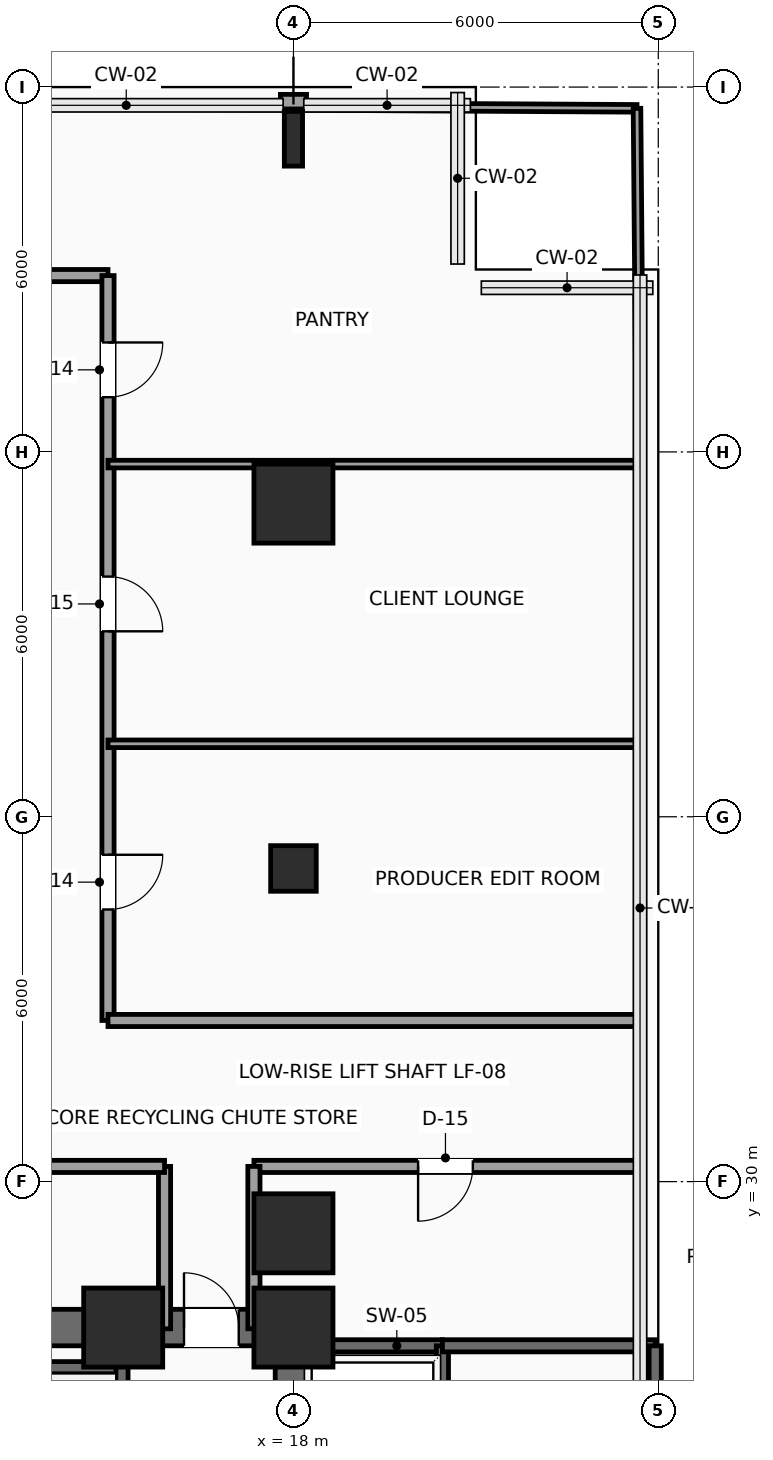
"""IFC4 building model, lengths in metres.
Left out: names, types, materials, properties, quantities, classifications, styles, units other than length and angle.
Written with IfcOpenShell. Run it as: python <this file> out.ifc"""

import sys

from ifc_helpers import new_model, si_unit, direction, frame, frame_2d, origin, origin_2d, place, context, subcontext, project, spatial, rectangle, hollow_rectangle, i_section, extrude, element, fill, save


model = new_model("IFC4")
c1 = context("Model", 3, precision=1e-05, world=origin(), true_north=direction((0.0, 1.0)))
c2 = subcontext(c1, "Body", "Model", "MODEL_VIEW")
j1 = project(units=[si_unit("LENGTHUNIT", "METRE"), si_unit("PLANEANGLEUNIT", "RADIAN")], contexts=[c1])
p1 = place(None, origin())
s1 = spatial("IfcSite", under=j1, at=p1, CompositionType="ELEMENT")
p2 = place(p1, origin())
s2 = spatial("IfcBuilding", under=s1, at=p2, CompositionType="ELEMENT")
p3 = place(p2, frame((0.0, 0.0, 48.0)))
s3 = spatial("IfcBuildingStorey", under=s2, at=p3, CompositionType="ELEMENT", Elevation=48.0)
for number, where, z_axis, x_axis in (
    (1, (15.2, 27.6, 0.0), (0.0, 0.0, 1.0), (1.0, 0.0, 0.0)),
    (2, (18.0, 27.6, 0.0), (0.0, 0.0, 1.0), (1.0, 0.0, 0.0)),
    (3, (18.0, 29.15, 0.0), (0.0, 0.0, 1.0), (1.0, 0.0, 0.0)),
):
    element("IfcColumn", number, at=place(p3, frame(where, z_axis=z_axis, x_axis=x_axis)), inside=s3, PredefinedType="COLUMN", context=c2, shape_type="SweptSolid", body=[
        extrude(rectangle(XDim=1.3, YDim=1.3, at=origin_2d()), origin(), (0.0, 0.0, 1.0), 3.9),
    ])
p4 = place(p3, frame((18.0, 35.15, 0.0), z_axis=(0.0, 0.0, 1.0), x_axis=(1.0, 0.0, 0.0)))
e4 = element("IfcColumn", 4, at=p4, inside=s3, PredefinedType="COLUMN", context=c2, shape_type="SweptSolid", body=[
    extrude(hollow_rectangle(XDim=0.75, YDim=0.75, WallThickness=0.035, InnerFilletRadius=0.035, OuterFilletRadius=0.05, at=origin_2d()), origin(), (0.0, 0.0, 1.0), 3.9),
])
p5 = place(p3, frame((18.0, 41.15, 0.0), z_axis=(0.0, 0.0, 1.0), x_axis=(1.0, 0.0, 0.0)))
e5 = element("IfcColumn", 5, at=p5, inside=s3, PredefinedType="COLUMN", context=c2, shape_type="SweptSolid", body=[
    extrude(rectangle(XDim=1.3, YDim=1.3, at=origin_2d()), origin(), (0.0, 0.0, 1.0), 3.9),
])
p6 = place(p3, frame((18.0, 47.15, 0.0), z_axis=(0.0, 0.0, 1.0), x_axis=(1.0, 0.0, 0.0)))
e6 = element("IfcColumn", 6, at=p6, inside=s3, PredefinedType="COLUMN", context=c2, shape_type="SweptSolid", body=[
    extrude(i_section(OverallWidth=0.3, OverallDepth=0.9, WebThickness=0.019, FlangeThickness=0.035, FilletRadius=0.03, at=origin_2d()), origin(), (0.0, 0.0, 1.0), 3.9),
])
p7 = place(p3, frame((17.785, 47.76, 0.0), z_axis=(0.0, 0.0, 1.0), x_axis=(1.0, 0.0, 0.0)))
e7 = element("IfcWall", 7, at=p7, inside=s3, PredefinedType="SOLIDWALL", context=c2, shape_type="SweptSolid", body=[
    extrude(rectangle(XDim=0.43, YDim=0.24, at=frame_2d((0.215, 0.0))), origin(), (0.0, 0.0, 1.0), 3.65),
])
p8 = place(p3, frame((6.0, 27.6, 0.0), z_axis=(0.0, 0.0, 1.0), x_axis=(1.0, 0.0, 0.0)))
e8 = element("IfcWall", 8, at=p8, inside=s3, PredefinedType="SHEAR", context=c2, shape_type="SweptSolid", body=[
    extrude(rectangle(XDim=12.0, YDim=0.6, at=frame_2d((6.0, 0.0))), origin(), (0.0, 0.0, 1.0), 3.65),
])
p9 = place(p8, frame((10.2, 0.0, 0.0)))
e9 = element("IfcOpeningElement", 9, at=p9, cuts=e8, PredefinedType="OPENING", context=c2, shape_type="SweptSolid", body=[
    extrude(rectangle(XDim=0.9, YDim=2.15, at=frame_2d((0.45, 1.075))), frame((0.0, 0.31, 0.0), z_axis=(0.0, -1.0, 0.0), x_axis=(1.0, 0.0, 0.0)), (0.0, 0.0, 1.0), 0.62),
])
p10 = place(p3, frame((18.0, 18.0, 0.0), z_axis=(0.0, 0.0, 1.0), x_axis=(0.0, 1.0, 0.0)))
e10 = element("IfcWall", 10, at=p10, inside=s3, PredefinedType="SHEAR", context=c2, shape_type="SweptSolid", body=[
    extrude(rectangle(XDim=9.6, YDim=0.6, at=frame_2d((4.8, 0.0))), origin(), (0.0, 0.0, 1.0), 3.65),
])
p11 = place(p3, frame((6.3, 26.94, 0.0), z_axis=(0.0, 0.0, 1.0), x_axis=(1.0, 0.0, 0.0)))
e11 = element("IfcWall", 11, at=p11, inside=s3, PredefinedType="SHEAR", context=c2, shape_type="SweptSolid", body=[
    extrude(rectangle(XDim=8.88, YDim=0.2, at=frame_2d((4.44, 0.0))), origin(), (0.0, 0.0, 1.0), 3.65),
])
p12 = place(p3, frame((15.18, 23.26, 0.0), z_axis=(0.0, 0.0, 1.0), x_axis=(0.0, 1.0, 0.0)))
e12 = element("IfcWall", 12, at=p12, inside=s3, PredefinedType="SHEAR", context=c2, shape_type="SweptSolid", body=[
    extrude(rectangle(XDim=4.04, YDim=0.2, at=frame_2d((2.02, 0.0))), origin(), (0.0, 0.0, 1.0), 3.65),
])
p13 = place(p3, frame((18.1, 27.3, 0.0), z_axis=(0.0, 0.0, 1.0), x_axis=(1.0, 0.0, 0.0)))
e13 = element("IfcWall", 13, at=p13, inside=s3, PredefinedType="SHEAR", context=c2, shape_type="SweptSolid", body=[
    extrude(rectangle(XDim=2.35, YDim=0.2, at=frame_2d((1.175, 0.0))), origin(), (0.0, 0.0, 1.0), 3.65),
])
p14 = place(p3, frame((20.45, 18.25, 0.0), z_axis=(0.0, 0.0, 1.0), x_axis=(0.0, 1.0, 0.0)))
e14 = element("IfcWall", 14, at=p14, inside=s3, PredefinedType="SHEAR", context=c2, shape_type="SweptSolid", body=[
    extrude(rectangle(XDim=9.05, YDim=0.2, at=frame_2d((4.525, 0.0))), origin(), (0.0, 0.0, 1.0), 3.65),
])
p15 = place(p14, frame((0.4, 0.0, 0.0)))
e15 = element("IfcOpeningElement", 15, at=p15, cuts=e14, PredefinedType="OPENING", context=c2, shape_type="SweptSolid", body=[
    extrude(rectangle(XDim=1.2, YDim=2.2, at=frame_2d((0.6, 1.1))), frame((0.0, 0.11, 0.0), z_axis=(0.0, -1.0, 0.0), x_axis=(1.0, 0.0, 0.0)), (0.0, 0.0, 1.0), 0.22),
])
p16 = place(p14, frame((2.65, 0.0, 0.0)))
e16 = element("IfcOpeningElement", 16, at=p16, cuts=e14, PredefinedType="OPENING", context=c2, shape_type="SweptSolid", body=[
    extrude(rectangle(XDim=1.2, YDim=2.2, at=frame_2d((0.6, 1.1))), frame((0.0, 0.11, 0.0), z_axis=(0.0, -1.0, 0.0), x_axis=(1.0, 0.0, 0.0)), (0.0, 0.0, 1.0), 0.22),
])
p17 = place(p14, frame((4.9, 0.0, 0.0)))
e17 = element("IfcOpeningElement", 17, at=p17, cuts=e14, PredefinedType="OPENING", context=c2, shape_type="SweptSolid", body=[
    extrude(rectangle(XDim=1.2, YDim=2.2, at=frame_2d((0.6, 1.1))), frame((0.0, 0.11, 0.0), z_axis=(0.0, -1.0, 0.0), x_axis=(1.0, 0.0, 0.0)), (0.0, 0.0, 1.0), 0.22),
])
p18 = place(p14, frame((7.15, 0.0, 0.0)))
e18 = element("IfcOpeningElement", 18, at=p18, cuts=e14, PredefinedType="OPENING", context=c2, shape_type="SweptSolid", body=[
    extrude(rectangle(XDim=1.2, YDim=2.2, at=frame_2d((0.6, 1.1))), frame((0.0, 0.11, 0.0), z_axis=(0.0, -1.0, 0.0), x_axis=(1.0, 0.0, 0.0)), (0.0, 0.0, 1.0), 0.22),
])
p19 = place(p3, frame((20.45, 27.3, 0.0), z_axis=(0.0, 0.0, 1.0), x_axis=(1.0, 0.0, 0.0)))
e19 = element("IfcWall", 19, at=p19, inside=s3, PredefinedType="SHEAR", context=c2, shape_type="SweptSolid", body=[
    extrude(rectangle(XDim=3.5, YDim=0.2, at=frame_2d((1.75, 0.0))), origin(), (0.0, 0.0, 1.0), 3.65),
])
p20 = place(p3, frame((23.95, 18.0, 0.0), z_axis=(0.0, 0.0, 1.0), x_axis=(0.0, 1.0, 0.0)))
e20 = element("IfcWall", 20, at=p20, inside=s3, PredefinedType="SHEAR", context=c2, shape_type="SweptSolid", body=[
    extrude(rectangle(XDim=9.3, YDim=0.2, at=frame_2d((4.65, 0.0))), origin(), (0.0, 0.0, 1.0), 3.65),
])
p21 = place(p3, frame((12.6, 44.9, 0.0), z_axis=(0.0, 0.0, 1.0), x_axis=(1.0, 0.0, 0.0)))
e21 = element("IfcWall", 21, at=p21, inside=s3, PredefinedType="PARTITIONING", context=c2, shape_type="SweptSolid", body=[
    extrude(rectangle(XDim=2.35, YDim=0.2, at=frame_2d((1.175, 0.0))), origin(), (0.0, 0.0, 1.0), 3.65),
])
p22 = place(p3, frame((14.95, 44.9, 0.0), z_axis=(0.0, 0.0, 1.0), x_axis=(0.0, -1.0, 0.0)))
e22 = element("IfcWall", 22, at=p22, inside=s3, PredefinedType="PARTITIONING", context=c2, shape_type="SweptSolid", body=[
    extrude(rectangle(XDim=12.25, YDim=0.2, at=frame_2d((6.125, 0.0))), origin(), (0.0, 0.0, 1.0), 3.65),
])
p23 = place(p22, frame((9.525, 0.0, 0.0)))
e23 = element("IfcOpeningElement", 23, at=p23, cuts=e22, PredefinedType="OPENING", context=c2, shape_type="SweptSolid", body=[
    extrude(rectangle(XDim=0.9, YDim=2.1, at=frame_2d((0.45, 1.05))), frame((0.0, 0.11, 0.0), z_axis=(0.0, -1.0, 0.0), x_axis=(1.0, 0.0, 0.0)), (0.0, 0.0, 1.0), 0.22),
])
p24 = place(p22, frame((4.95, 0.0, 0.0)))
e24 = element("IfcOpeningElement", 24, at=p24, cuts=e22, PredefinedType="OPENING", context=c2, shape_type="SweptSolid", body=[
    extrude(rectangle(XDim=0.9, YDim=2.1, at=frame_2d((0.45, 1.05))), frame((0.0, 0.11, 0.0), z_axis=(0.0, -1.0, 0.0), x_axis=(1.0, 0.0, 0.0)), (0.0, 0.0, 1.0), 0.22),
])
p25 = place(p22, frame((1.1, 0.0, 0.0)))
e25 = element("IfcOpeningElement", 25, at=p25, cuts=e22, PredefinedType="OPENING", context=c2, shape_type="SweptSolid", body=[
    extrude(rectangle(XDim=0.9, YDim=2.1, at=frame_2d((0.45, 1.05))), frame((0.0, 0.11, 0.0), z_axis=(0.0, -1.0, 0.0), x_axis=(1.0, 0.0, 0.0)), (0.0, 0.0, 1.0), 0.22),
])
p26 = place(p3, frame((14.95, 32.65, 0.0), z_axis=(0.0, 0.0, 1.0), x_axis=(1.0, 0.0, 0.0)))
e26 = element("IfcWall", 26, at=p26, inside=s3, PredefinedType="PARTITIONING", context=c2, shape_type="SweptSolid", body=[
    extrude(rectangle(XDim=8.75, YDim=0.2, at=frame_2d((4.375, 0.0))), origin(), (0.0, 0.0, 1.0), 3.65),
])
p27 = place(p3, frame((23.7, 30.25, 0.0), z_axis=(0.0, 0.0, 1.0), x_axis=(-1.0, 0.0, 0.0)))
e27 = element("IfcWall", 27, at=p27, inside=s3, PredefinedType="PARTITIONING", context=c2, shape_type="SweptSolid", body=[
    extrude(rectangle(XDim=6.35, YDim=0.2, at=frame_2d((3.175, 0.0))), origin(), (0.0, 0.0, 1.0), 3.65),
])
p28 = place(p27, frame((2.75, 0.0, 0.0)))
e28 = element("IfcOpeningElement", 28, at=p28, cuts=e27, PredefinedType="OPENING", context=c2, shape_type="SweptSolid", body=[
    extrude(rectangle(XDim=0.9, YDim=2.1, at=frame_2d((0.45, 1.05))), frame((0.0, 0.11, 0.0), z_axis=(0.0, -1.0, 0.0), x_axis=(1.0, 0.0, 0.0)), (0.0, 0.0, 1.0), 0.22),
])
for number, where, z_axis, x_axis in (
    (29, (17.35, 30.25, 0.0), (0.0, 0.0, 1.0), (0.0, -1.0, 0.0)),
    (30, (15.88, 27.58, 0.0), (0.0, 0.0, 1.0), (0.0, 1.0, 0.0)),
):
    element("IfcWall", number, at=place(p3, frame(where, z_axis=z_axis, x_axis=x_axis)), inside=s3, PredefinedType="PARTITIONING", context=c2, shape_type="SweptSolid", body=[
        extrude(rectangle(XDim=2.67, YDim=0.2, at=frame_2d((1.335, 0.0))), origin(), (0.0, 0.0, 1.0), 3.65),
    ])
p29 = place(p3, frame((15.88, 30.25, 0.0), z_axis=(0.0, 0.0, 1.0), x_axis=(-1.0, 0.0, 0.0)))
e31 = element("IfcWall", 31, at=p29, inside=s3, PredefinedType="PARTITIONING", context=c2, shape_type="SweptSolid", body=[
    extrude(rectangle(XDim=10.63, YDim=0.2, at=frame_2d((5.315, 0.0))), origin(), (0.0, 0.0, 1.0), 3.65),
])
p30 = place(p29, frame((6.13, 0.0, 0.0)))
e32 = element("IfcOpeningElement", 32, at=p30, cuts=e31, PredefinedType="OPENING", context=c2, shape_type="SweptSolid", body=[
    extrude(rectangle(XDim=0.9, YDim=2.1, at=frame_2d((0.45, 1.05))), frame((0.0, 0.11, 0.0), z_axis=(0.0, -1.0, 0.0), x_axis=(1.0, 0.0, 0.0)), (0.0, 0.0, 1.0), 0.22),
])
for number, where, z_axis, x_axis in (
    (33, (14.95, 37.2, 0.0), (0.0, 0.0, 1.0), (1.0, 0.0, 0.0)),
    (34, (14.95, 41.8, 0.0), (0.0, 0.0, 1.0), (1.0, 0.0, 0.0)),
):
    element("IfcWall", number, at=place(p3, frame(where, z_axis=z_axis, x_axis=x_axis)), inside=s3, PredefinedType="PARTITIONING", context=c2, shape_type="SweptSolid", body=[
        extrude(rectangle(XDim=8.75, YDim=0.125, at=frame_2d((4.375, 0.0))), origin(), (0.0, 0.0, 1.0), 3.65),
    ])
p31 = place(p3, frame((14.95, 47.7, 0.0), z_axis=(0.0, 0.0, 1.0), x_axis=(0.999983354582, -0.005769797172, 0.0)))
e35 = element("IfcWall", 35, at=p31, inside=s3, PredefinedType="PARTITIONING", context=c2, shape_type="SweptSolid", body=[
    extrude(rectangle(XDim=2.835, YDim=0.125, at=frame_2d((1.417, 0.0))), origin(), (0.0, 0.0, 1.0), 3.65),
])
p32 = place(p3, frame((18.215, 47.681, 0.0), z_axis=(0.0, 0.0, 1.0), x_axis=(0.999983469354, -0.005749871258, 0.0)))
e36 = element("IfcWall", 36, at=p32, inside=s3, PredefinedType="PARTITIONING", context=c2, shape_type="SweptSolid", body=[
    extrude(rectangle(XDim=5.435, YDim=0.125, at=frame_2d((2.717, 0.0))), origin(), (0.0, 0.0, 1.0), 3.65),
])
p33 = place(p3, frame((23.7, 41.8, 0.0), z_axis=(0.0, 0.0, 1.0), x_axis=(-0.00855525636, 0.999963403125, 0.0)))
e37 = element("IfcWall", 37, at=p33, inside=s3, PredefinedType="PARTITIONING", context=c2, shape_type="SweptSolid", body=[
    extrude(rectangle(XDim=5.85, YDim=0.125, at=frame_2d((2.925, 0.0))), origin(), (0.0, 0.0, 1.0), 3.65),
])
p34 = place(p9, origin())
e38 = element("IfcDoor", 38, at=p34, inside=s3, OperationType="SINGLE_SWING_LEFT", PredefinedType="DOOR", context=c2, shape_type="SweptSolid", body=[
    extrude(rectangle(XDim=0.9, YDim=2.15, at=frame_2d((0.45, 1.075))), frame((0.0, 0.025, 0.0), z_axis=(0.0, -1.0, 0.0), x_axis=(1.0, 0.0, 0.0)), (0.0, 0.0, 1.0), 0.05),
])
fill(e9, e38)
p35 = place(p23, origin())
e39 = element("IfcDoor", 39, at=p35, inside=s3, OperationType="SINGLE_SWING_LEFT", PredefinedType="DOOR", context=c2, shape_type="SweptSolid", body=[
    extrude(rectangle(XDim=0.9, YDim=2.1, at=frame_2d((0.45, 1.05))), frame((0.0, 0.025, 0.0), z_axis=(0.0, -1.0, 0.0), x_axis=(1.0, 0.0, 0.0)), (0.0, 0.0, 1.0), 0.05),
])
fill(e23, e39)
p36 = place(p24, origin())
e40 = element("IfcDoor", 40, at=p36, inside=s3, OperationType="SINGLE_SWING_RIGHT", PredefinedType="DOOR", context=c2, shape_type="SweptSolid", body=[
    extrude(rectangle(XDim=0.9, YDim=2.1, at=frame_2d((0.45, 1.05))), frame((0.0, 0.025, 0.0), z_axis=(0.0, -1.0, 0.0), x_axis=(1.0, 0.0, 0.0)), (0.0, 0.0, 1.0), 0.05),
])
fill(e24, e40)
p37 = place(p25, origin())
e41 = element("IfcDoor", 41, at=p37, inside=s3, OperationType="SINGLE_SWING_LEFT", PredefinedType="DOOR", context=c2, shape_type="SweptSolid", body=[
    extrude(rectangle(XDim=0.9, YDim=2.1, at=frame_2d((0.45, 1.05))), frame((0.0, 0.025, 0.0), z_axis=(0.0, -1.0, 0.0), x_axis=(1.0, 0.0, 0.0)), (0.0, 0.0, 1.0), 0.05),
])
fill(e25, e41)
p38 = place(p28, origin())
e42 = element("IfcDoor", 42, at=p38, inside=s3, OperationType="SINGLE_SWING_RIGHT", PredefinedType="DOOR", context=c2, shape_type="SweptSolid", body=[
    extrude(rectangle(XDim=0.9, YDim=2.1, at=frame_2d((0.45, 1.05))), frame((0.0, 0.025, 0.0), z_axis=(0.0, -1.0, 0.0), x_axis=(1.0, 0.0, 0.0)), (0.0, 0.0, 1.0), 0.05),
])
fill(e28, e42)
save(model, sys.argv[1])
